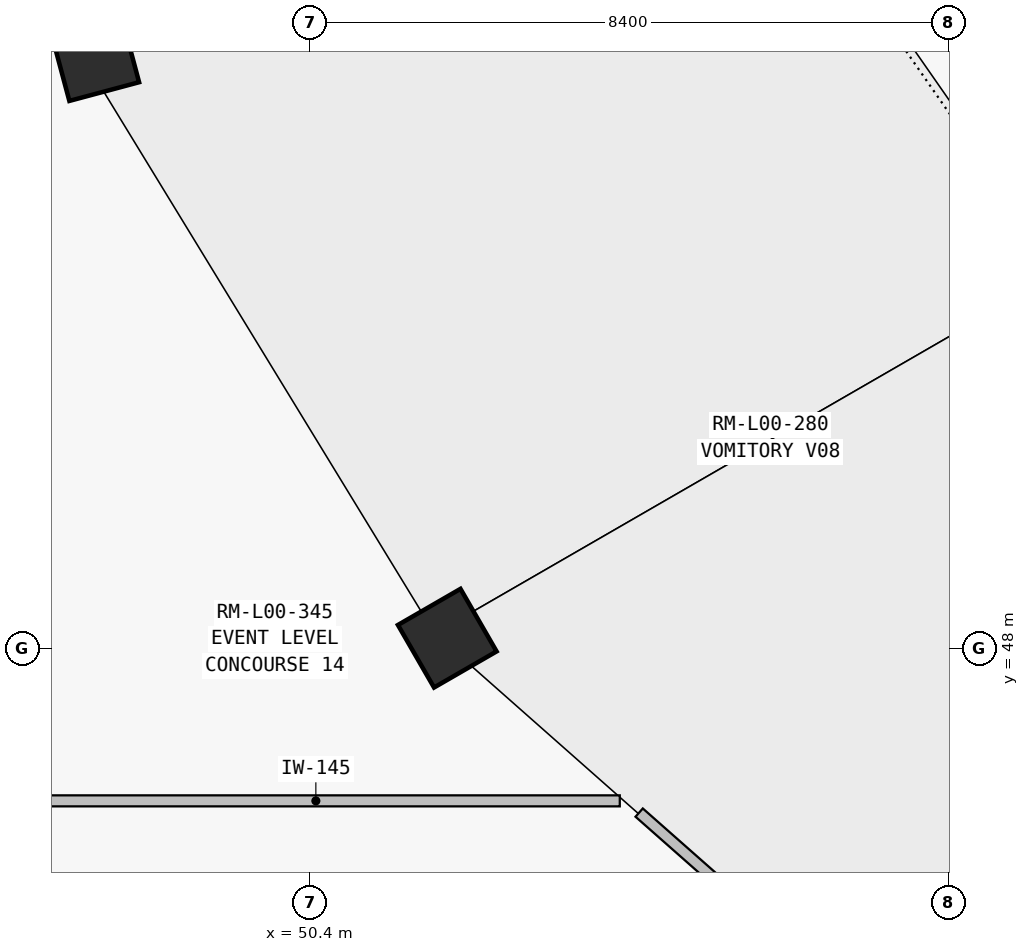
"""IFC4 building model, lengths in metres.
Left out: names, types, materials, properties, quantities, classifications, styles, units other than length and angle.
Written with IfcOpenShell. Run it as: python <this file> out.ifc"""

import sys

from ifc_helpers import new_model, si_unit, direction, frame, frame_2d, origin, origin_2d, place, context, subcontext, project, spatial, rectangle, extrude, element, save


model = new_model("IFC4")
c1 = context("Model", 3, precision=1e-05, world=origin(), true_north=direction((0.0, 1.0)))
c2 = subcontext(c1, "Body", "Model", "MODEL_VIEW")
j1 = project(units=[si_unit("LENGTHUNIT", "METRE"), si_unit("PLANEANGLEUNIT", "RADIAN")], contexts=[c1])
p1 = place(None, origin())
s1 = spatial("IfcSite", under=j1, at=p1, CompositionType="ELEMENT")
p2 = place(p1, origin())
s2 = spatial("IfcBuilding", under=s1, at=p2, CompositionType="ELEMENT")
p3 = place(p2, origin())
s3 = spatial("IfcBuildingStorey", under=s2, at=p3, CompositionType="ELEMENT", Elevation=0.0)
for number, where, z_axis, x_axis in (
    (1, (47.571, 55.79, 0.0), (0.0, 0.0, 1.0), (-0.966, -0.259, 0.0)),
    (2, (52.208, 48.14, 0.0), (0.0, 0.0, 1.0), (-0.866, -0.5, 0.0)),
):
    element("IfcColumn", number, at=place(p3, frame(where, z_axis=z_axis, x_axis=x_axis)), inside=s3, PredefinedType="COLUMN", context=c2, shape_type="SweptSolid", body=[
        extrude(rectangle(XDim=0.95, YDim=0.95, at=origin_2d()), origin(), (0.0, 0.0, 1.0), 5.4),
    ])
p4 = place(p3, frame((46.48, 46.0, 0.0), z_axis=(0.0, 0.0, 1.0), x_axis=(1.0, 0.0, 0.0)))
e3 = element("IfcWall", 3, at=p4, inside=s3, PredefinedType="PARTITIONING", context=c2, shape_type="SweptSolid", body=[
    extrude(rectangle(XDim=7.998, YDim=0.145, at=frame_2d((3.999, 0.0))), origin(), (0.0, 0.0, 1.0), 4.315),
])
p5 = place(p3, frame((54.732, 45.846, 0.0), z_axis=(0.0, 0.0, 1.0), x_axis=(0.749699794186, -0.661778073524, 0.0)))
e4 = element("IfcWall", 4, at=p5, inside=s3, PredefinedType="PARTITIONING", context=c2, shape_type="SweptSolid", body=[
    extrude(rectangle(XDim=6.245, YDim=0.145, at=frame_2d((3.123, 0.0))), origin(), (0.0, 0.0, 1.0), 4.315),
])
save(model, sys.argv[1])
